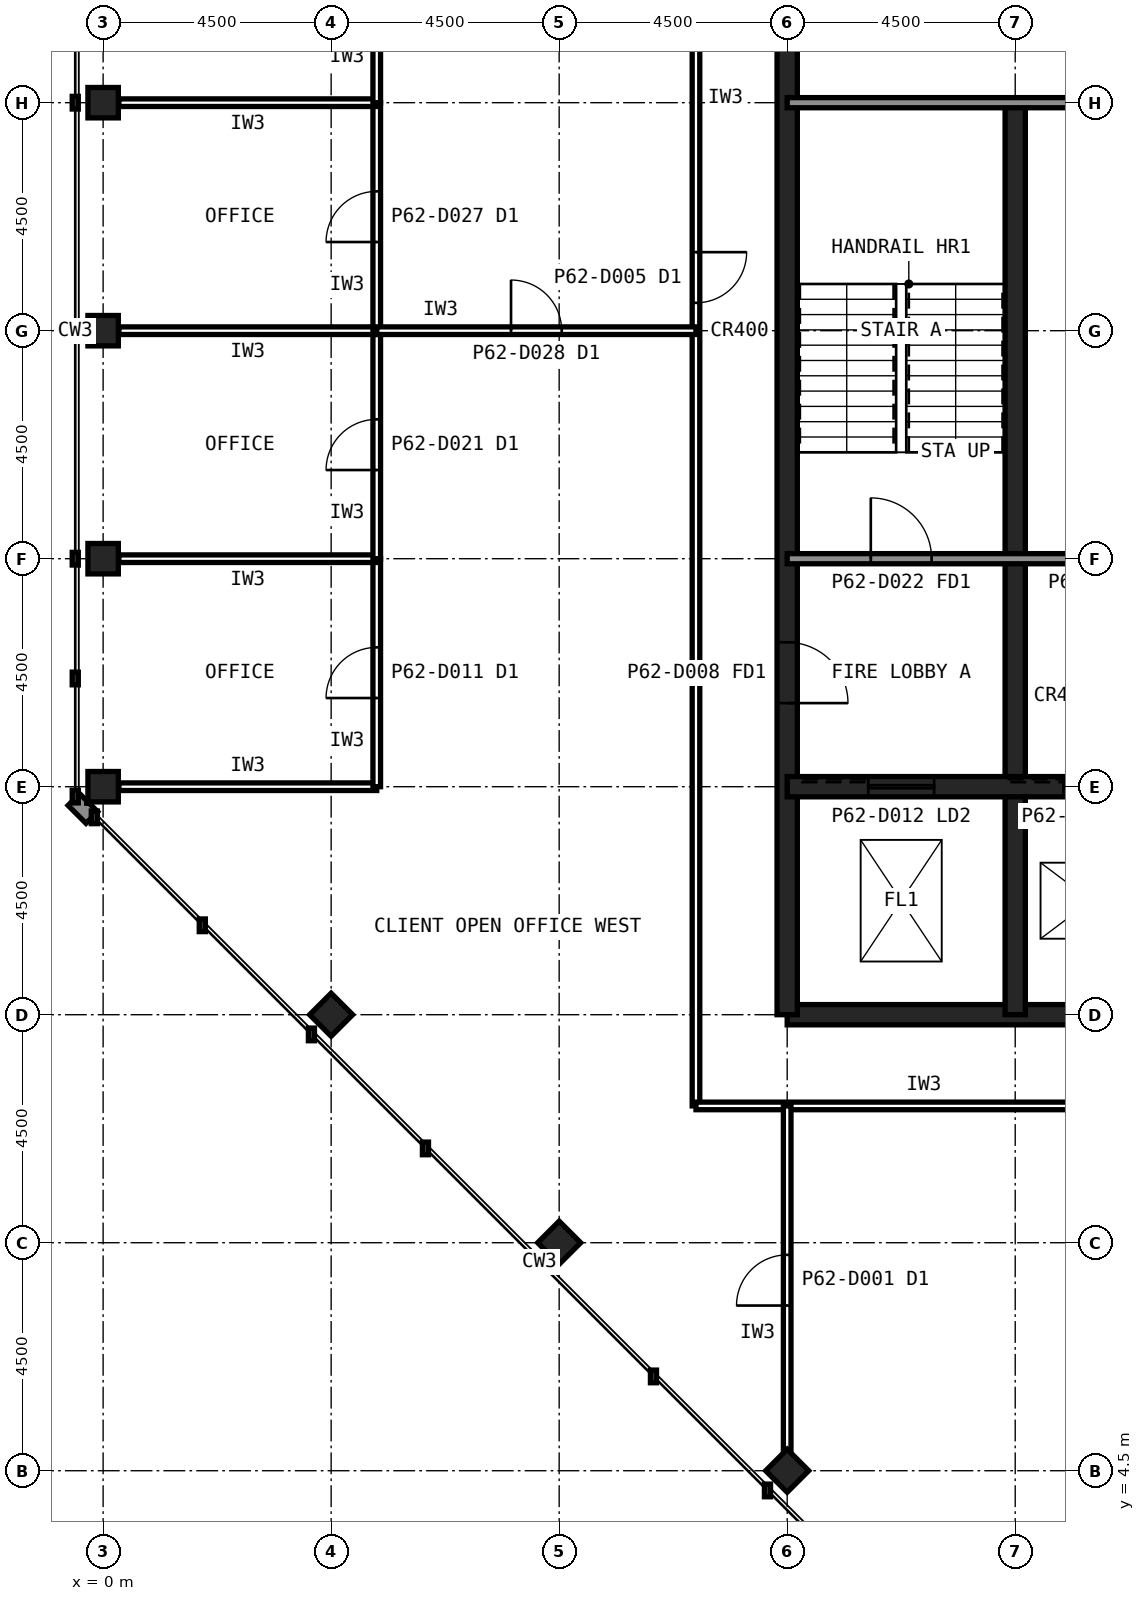
"""IFC4 building model, lengths in metres.
Left out: names, types, materials, properties, quantities, classifications, styles, units other than length and angle.
Written with IfcOpenShell. Run it as: python <this file> out.ifc"""

import sys

from ifc_helpers import new_model, si_unit, direction, frame, frame_2d, origin, origin_2d, place, context, subcontext, project, spatial, rectangle, hollow_rectangle, extrude, element, fill, save


model = new_model("IFC4")
c1 = context("Model", 3, precision=1e-05, world=origin(), true_north=direction((0.0, 1.0)))
c2 = subcontext(c1, "Body", "Model", "MODEL_VIEW")
j1 = project(units=[si_unit("LENGTHUNIT", "METRE"), si_unit("PLANEANGLEUNIT", "RADIAN")], contexts=[c1])
p1 = place(None, origin())
s1 = spatial("IfcSite", under=j1, at=p1, CompositionType="ELEMENT")
p2 = place(p1, origin())
s2 = spatial("IfcBuilding", under=s1, at=p2, CompositionType="ELEMENT")
p3 = place(p2, frame((0.0, 0.0, 262.6)))
s3 = spatial("IfcBuildingStorey", under=s2, at=p3, CompositionType="ELEMENT", Elevation=262.6)
for number, where, z_axis, x_axis in (
    (1, (0.0, 31.5, 0.0), (0.0, 0.0, 1.0), (1.0, 0.0, 0.0)),
    (2, (0.0, 27.0, 0.0), (0.0, 0.0, 1.0), (1.0, 0.0, 0.0)),
    (3, (0.0, 22.5, 0.0), (0.0, 0.0, 1.0), (1.0, 0.0, 0.0)),
    (4, (0.0, 18.0, 0.0), (0.0, 0.0, 1.0), (1.0, 0.0, 0.0)),
    (5, (13.5, 4.5, 0.0), (0.0, 0.0, 1.0), (0.707, 0.707, 0.0)),
    (6, (9.0, 9.0, 0.0), (0.0, 0.0, 1.0), (0.707, 0.707, 0.0)),
    (7, (4.5, 13.5, 0.0), (0.0, 0.0, 1.0), (0.707, 0.707, 0.0)),
):
    element("IfcColumn", number, at=place(p3, frame(where, z_axis=z_axis, x_axis=x_axis)), inside=s3, PredefinedType="COLUMN", context=c2, shape_type="SweptSolid", body=[
        extrude(hollow_rectangle(XDim=0.6, YDim=0.6, WallThickness=0.028, at=origin_2d()), origin(), (0.0, 0.0, 1.0), 4.0),
    ])
p4 = place(p3, frame((13.5, 13.5, 0.0), z_axis=(0.0, 0.0, 1.0), x_axis=(1.0, 0.0, 0.0)))
e8 = element("IfcWall", 8, at=p4, inside=s3, PredefinedType="SHEAR", context=c2, shape_type="SweptSolid", body=[
    extrude(rectangle(XDim=27.0, YDim=0.4, at=frame_2d((13.5, 0.0))), origin(), (0.0, 0.0, 1.0), 4.0),
])
p5 = place(p3, frame((13.5, 40.5, 0.0), z_axis=(0.0, 0.0, 1.0), x_axis=(0.0, -1.0, 0.0)))
e9 = element("IfcWall", 9, at=p5, inside=s3, PredefinedType="SHEAR", context=c2, shape_type="SweptSolid", body=[
    extrude(rectangle(XDim=27.0, YDim=0.4, at=frame_2d((13.5, 0.0))), origin(), (0.0, 0.0, 1.0), 4.0),
])
p6 = place(p5, frame((19.65, 0.0, 0.0)))
e10 = element("IfcOpeningElement", 10, at=p6, cuts=e9, PredefinedType="OPENING", context=c2, shape_type="SweptSolid", body=[
    extrude(rectangle(XDim=1.2, YDim=2.1, at=frame_2d((0.6, 1.05))), frame((0.0, 0.21, 0.0), z_axis=(0.0, -1.0, 0.0), x_axis=(1.0, 0.0, 0.0)), (0.0, 0.0, 1.0), 0.42),
])
p7 = place(p5, frame((5.85, 0.0, 0.0)))
e11 = element("IfcOpeningElement", 11, at=p7, cuts=e9, PredefinedType="OPENING", context=c2, shape_type="SweptSolid", body=[
    extrude(rectangle(XDim=1.8, YDim=2.1, at=frame_2d((0.9, 1.05))), frame((0.0, 0.21, 0.0), z_axis=(0.0, -1.0, 0.0), x_axis=(1.0, 0.0, 0.0)), (0.0, 0.0, 1.0), 0.42),
])
p8 = place(p3, frame((18.0, 13.5, 0.0), z_axis=(0.0, 0.0, 1.0), x_axis=(0.0, 1.0, 0.0)))
e12 = element("IfcWall", 12, at=p8, inside=s3, PredefinedType="SHEAR", context=c2, shape_type="SweptSolid", body=[
    extrude(rectangle(XDim=18.0, YDim=0.4, at=frame_2d((9.0, 0.0))), origin(), (0.0, 0.0, 1.0), 4.0),
])
p9 = place(p3, frame((13.5, 18.0, 0.0), z_axis=(0.0, 0.0, 1.0), x_axis=(1.0, 0.0, 0.0)))
e13 = element("IfcWall", 13, at=p9, inside=s3, PredefinedType="SHEAR", context=c2, shape_type="SweptSolid", body=[
    extrude(rectangle(XDim=27.0, YDim=0.4, at=frame_2d((13.5, 0.0))), origin(), (0.0, 0.0, 1.0), 4.0),
])
p10 = place(p9, frame((24.3, 0.0, 0.0)))
e14 = element("IfcOpeningElement", 14, at=p10, cuts=e13, PredefinedType="OPENING", context=c2, shape_type="SweptSolid", body=[
    extrude(rectangle(XDim=0.9, YDim=2.1, at=frame_2d((0.45, 1.05))), frame((0.0, 0.21, 0.0), z_axis=(0.0, -1.0, 0.0), x_axis=(1.0, 0.0, 0.0)), (0.0, 0.0, 1.0), 0.42),
])
p11 = place(p9, frame((5.45, 0.0, 0.0)))
e15 = element("IfcOpeningElement", 15, at=p11, cuts=e13, PredefinedType="OPENING", context=c2, shape_type="SweptSolid", body=[
    extrude(rectangle(XDim=1.1, YDim=2.1, at=frame_2d((0.55, 1.05))), frame((0.0, 0.21, 0.0), z_axis=(0.0, -1.0, 0.0), x_axis=(1.0, 0.0, 0.0)), (0.0, 0.0, 1.0), 0.42),
])
p12 = place(p9, frame((8.45, 0.0, 0.0)))
e16 = element("IfcOpeningElement", 16, at=p12, cuts=e13, PredefinedType="OPENING", context=c2, shape_type="SweptSolid", body=[
    extrude(rectangle(XDim=1.1, YDim=2.1, at=frame_2d((0.55, 1.05))), frame((0.0, 0.21, 0.0), z_axis=(0.0, -1.0, 0.0), x_axis=(1.0, 0.0, 0.0)), (0.0, 0.0, 1.0), 0.42),
])
p13 = place(p9, frame((11.45, 0.0, 0.0)))
e17 = element("IfcOpeningElement", 17, at=p13, cuts=e13, PredefinedType="OPENING", context=c2, shape_type="SweptSolid", body=[
    extrude(rectangle(XDim=1.1, YDim=2.1, at=frame_2d((0.55, 1.05))), frame((0.0, 0.21, 0.0), z_axis=(0.0, -1.0, 0.0), x_axis=(1.0, 0.0, 0.0)), (0.0, 0.0, 1.0), 0.42),
])
p14 = place(p9, frame((14.45, 0.0, 0.0)))
e18 = element("IfcOpeningElement", 18, at=p14, cuts=e13, PredefinedType="OPENING", context=c2, shape_type="SweptSolid", body=[
    extrude(rectangle(XDim=1.1, YDim=2.1, at=frame_2d((0.55, 1.05))), frame((0.0, 0.21, 0.0), z_axis=(0.0, -1.0, 0.0), x_axis=(1.0, 0.0, 0.0)), (0.0, 0.0, 1.0), 0.42),
])
p15 = place(p9, frame((17.45, 0.0, 0.0)))
e19 = element("IfcOpeningElement", 19, at=p15, cuts=e13, PredefinedType="OPENING", context=c2, shape_type="SweptSolid", body=[
    extrude(rectangle(XDim=1.1, YDim=2.1, at=frame_2d((0.55, 1.05))), frame((0.0, 0.21, 0.0), z_axis=(0.0, -1.0, 0.0), x_axis=(1.0, 0.0, 0.0)), (0.0, 0.0, 1.0), 0.42),
])
p16 = place(p9, frame((20.45, 0.0, 0.0)))
e20 = element("IfcOpeningElement", 20, at=p16, cuts=e13, PredefinedType="OPENING", context=c2, shape_type="SweptSolid", body=[
    extrude(rectangle(XDim=1.1, YDim=2.1, at=frame_2d((0.55, 1.05))), frame((0.0, 0.21, 0.0), z_axis=(0.0, -1.0, 0.0), x_axis=(1.0, 0.0, 0.0)), (0.0, 0.0, 1.0), 0.42),
])
p17 = place(p9, frame((1.6, 0.0, 0.0)))
e21 = element("IfcOpeningElement", 21, at=p17, cuts=e13, PredefinedType="OPENING", context=c2, shape_type="SweptSolid", body=[
    extrude(rectangle(XDim=1.3, YDim=2.2, at=frame_2d((0.65, 1.1))), frame((0.0, 0.21, 0.0), z_axis=(0.0, -1.0, 0.0), x_axis=(1.0, 0.0, 0.0)), (0.0, 0.0, 1.0), 0.42),
])
p18 = place(p3, frame((13.5, 22.5, 0.0), z_axis=(0.0, 0.0, 1.0), x_axis=(1.0, 0.0, 0.0)))
e22 = element("IfcWall", 22, at=p18, inside=s3, PredefinedType="SOLIDWALL", context=c2, shape_type="SweptSolid", body=[
    extrude(rectangle(XDim=27.0, YDim=0.2, at=frame_2d((13.5, 0.0))), origin(), (0.0, 0.0, 1.0), 3.84),
])
p19 = place(p18, frame((1.65, 0.0, 0.0)))
e23 = element("IfcOpeningElement", 23, at=p19, cuts=e22, PredefinedType="OPENING", context=c2, shape_type="SweptSolid", body=[
    extrude(rectangle(XDim=1.2, YDim=2.1, at=frame_2d((0.6, 1.05))), frame((0.0, 0.11, 0.0), z_axis=(0.0, -1.0, 0.0), x_axis=(1.0, 0.0, 0.0)), (0.0, 0.0, 1.0), 0.22),
])
p20 = place(p18, frame((6.025, 0.0, 0.0)))
e24 = element("IfcOpeningElement", 24, at=p20, cuts=e22, PredefinedType="OPENING", context=c2, shape_type="SweptSolid", body=[
    extrude(rectangle(XDim=1.0, YDim=2.1, at=frame_2d((0.5, 1.05))), frame((0.0, 0.11, 0.0), z_axis=(0.0, -1.0, 0.0), x_axis=(1.0, 0.0, 0.0)), (0.0, 0.0, 1.0), 0.22),
])
p21 = place(p18, frame((10.525, 0.0, 0.0)))
e25 = element("IfcOpeningElement", 25, at=p21, cuts=e22, PredefinedType="OPENING", context=c2, shape_type="SweptSolid", body=[
    extrude(rectangle(XDim=1.0, YDim=2.1, at=frame_2d((0.5, 1.05))), frame((0.0, 0.11, 0.0), z_axis=(0.0, -1.0, 0.0), x_axis=(1.0, 0.0, 0.0)), (0.0, 0.0, 1.0), 0.22),
])
p22 = place(p18, frame((19.75, 0.0, 0.0)))
e26 = element("IfcOpeningElement", 26, at=p22, cuts=e22, PredefinedType="OPENING", context=c2, shape_type="SweptSolid", body=[
    extrude(rectangle(XDim=1.0, YDim=2.1, at=frame_2d((0.5, 1.05))), frame((0.0, 0.11, 0.0), z_axis=(0.0, -1.0, 0.0), x_axis=(1.0, 0.0, 0.0)), (0.0, 0.0, 1.0), 0.22),
])
p23 = place(p18, frame((15.05, 0.0, 0.0)))
e27 = element("IfcOpeningElement", 27, at=p23, cuts=e22, PredefinedType="OPENING", context=c2, shape_type="SweptSolid", body=[
    extrude(rectangle(XDim=1.4, YDim=2.4, at=frame_2d((0.7, 1.2))), frame((0.0, 0.11, 0.0), z_axis=(0.0, -1.0, 0.0), x_axis=(1.0, 0.0, 0.0)), (0.0, 0.0, 1.0), 0.22),
])
p24 = place(p3, frame((13.5, 31.5, 0.0), z_axis=(0.0, 0.0, 1.0), x_axis=(1.0, 0.0, 0.0)))
e28 = element("IfcWall", 28, at=p24, inside=s3, PredefinedType="SOLIDWALL", context=c2, shape_type="SweptSolid", body=[
    extrude(rectangle(XDim=27.0, YDim=0.2, at=frame_2d((13.5, 0.0))), origin(), (0.0, 0.0, 1.0), 3.84),
])
p25 = place(p24, frame((24.15, 0.0, 0.0)))
e29 = element("IfcOpeningElement", 29, at=p25, cuts=e28, PredefinedType="OPENING", context=c2, shape_type="SweptSolid", body=[
    extrude(rectangle(XDim=1.2, YDim=2.1, at=frame_2d((0.6, 1.05))), frame((0.0, 0.11, 0.0), z_axis=(0.0, -1.0, 0.0), x_axis=(1.0, 0.0, 0.0)), (0.0, 0.0, 1.0), 0.22),
])
p26 = place(p24, frame((15.3, 0.0, 0.0)))
e30 = element("IfcOpeningElement", 30, at=p26, cuts=e28, PredefinedType="OPENING", context=c2, shape_type="SweptSolid", body=[
    extrude(rectangle(XDim=0.9, YDim=2.1, at=frame_2d((0.45, 1.05))), frame((0.0, 0.11, 0.0), z_axis=(0.0, -1.0, 0.0), x_axis=(1.0, 0.0, 0.0)), (0.0, 0.0, 1.0), 0.22),
])
p27 = place(p24, frame((19.8, 0.0, 0.0)))
e31 = element("IfcOpeningElement", 31, at=p27, cuts=e28, PredefinedType="OPENING", context=c2, shape_type="SweptSolid", body=[
    extrude(rectangle(XDim=0.9, YDim=2.1, at=frame_2d((0.45, 1.05))), frame((0.0, 0.11, 0.0), z_axis=(0.0, -1.0, 0.0), x_axis=(1.0, 0.0, 0.0)), (0.0, 0.0, 1.0), 0.22),
])
p28 = place(p3, frame((11.7, 42.3, 0.0), z_axis=(0.0, 0.0, 1.0), x_axis=(0.0, -1.0, 0.0)))
e32 = element("IfcWall", 32, at=p28, inside=s3, PredefinedType="PARTITIONING", context=c2, shape_type="SweptSolid", body=[
    extrude(rectangle(XDim=30.6, YDim=0.15, at=frame_2d((15.3, 0.0))), origin(), (0.0, 0.0, 1.0), 3.84),
])
p29 = place(p28, frame((13.75, 0.0, 0.0)))
e33 = element("IfcOpeningElement", 33, at=p29, cuts=e32, PredefinedType="OPENING", context=c2, shape_type="SweptSolid", body=[
    extrude(rectangle(XDim=1.0, YDim=2.1, at=frame_2d((0.5, 1.05))), frame((0.0, 0.085, 0.0), z_axis=(0.0, -1.0, 0.0), x_axis=(1.0, 0.0, 0.0)), (0.0, 0.0, 1.0), 0.17),
])
p30 = place(p3, frame((11.7, 11.7, 0.0), z_axis=(0.0, 0.0, 1.0), x_axis=(1.0, 0.0, 0.0)))
e34 = element("IfcWall", 34, at=p30, inside=s3, PredefinedType="PARTITIONING", context=c2, shape_type="SweptSolid", body=[
    extrude(rectangle(XDim=9.0, YDim=0.15, at=frame_2d((4.5, 0.0))), origin(), (0.0, 0.0, 1.0), 3.84),
])
p31 = place(p3, frame((0.31, 18.0, 0.0), z_axis=(0.0, 0.0, 1.0), x_axis=(1.0, 0.0, 0.0)))
e35 = element("IfcWall", 35, at=p31, inside=s3, PredefinedType="PARTITIONING", context=c2, shape_type="SweptSolid", body=[
    extrude(rectangle(XDim=5.09, YDim=0.15, at=frame_2d((2.545, 0.0))), origin(), (0.0, 0.0, 1.0), 2.989),
])
p32 = place(p3, frame((5.4, 18.0, 0.0), z_axis=(0.0, 0.0, 1.0), x_axis=(0.0, 1.0, 0.0)))
e36 = element("IfcWall", 36, at=p32, inside=s3, PredefinedType="PARTITIONING", context=c2, shape_type="SweptSolid", body=[
    extrude(rectangle(XDim=4.5, YDim=0.15, at=frame_2d((2.25, 0.0))), origin(), (0.0, 0.0, 1.0), 3.84),
])
p33 = place(p32, frame((1.75, 0.0, 0.0)))
e37 = element("IfcOpeningElement", 37, at=p33, cuts=e36, PredefinedType="OPENING", context=c2, shape_type="SweptSolid", body=[
    extrude(rectangle(XDim=1.0, YDim=2.1, at=frame_2d((0.5, 1.05))), frame((0.0, 0.085, 0.0), z_axis=(0.0, -1.0, 0.0), x_axis=(1.0, 0.0, 0.0)), (0.0, 0.0, 1.0), 0.17),
])
p34 = place(p3, frame((5.4, 22.5, 0.0), z_axis=(0.0, 0.0, 1.0), x_axis=(-1.0, 0.0, 0.0)))
e38 = element("IfcWall", 38, at=p34, inside=s3, PredefinedType="PARTITIONING", context=c2, shape_type="SweptSolid", body=[
    extrude(rectangle(XDim=5.09, YDim=0.15, at=frame_2d((2.545, 0.0))), origin(), (0.0, 0.0, 1.0), 2.989),
])
p35 = place(p3, frame((5.4, 22.5, 0.0), z_axis=(0.0, 0.0, 1.0), x_axis=(0.0, 1.0, 0.0)))
e39 = element("IfcWall", 39, at=p35, inside=s3, PredefinedType="PARTITIONING", context=c2, shape_type="SweptSolid", body=[
    extrude(rectangle(XDim=4.5, YDim=0.15, at=frame_2d((2.25, 0.0))), origin(), (0.0, 0.0, 1.0), 3.84),
])
p36 = place(p35, frame((1.75, 0.0, 0.0)))
e40 = element("IfcOpeningElement", 40, at=p36, cuts=e39, PredefinedType="OPENING", context=c2, shape_type="SweptSolid", body=[
    extrude(rectangle(XDim=1.0, YDim=2.1, at=frame_2d((0.5, 1.05))), frame((0.0, 0.085, 0.0), z_axis=(0.0, -1.0, 0.0), x_axis=(1.0, 0.0, 0.0)), (0.0, 0.0, 1.0), 0.17),
])
p37 = place(p3, frame((5.4, 27.0, 0.0), z_axis=(0.0, 0.0, 1.0), x_axis=(-1.0, 0.0, 0.0)))
e41 = element("IfcWall", 41, at=p37, inside=s3, PredefinedType="PARTITIONING", context=c2, shape_type="SweptSolid", body=[
    extrude(rectangle(XDim=5.09, YDim=0.15, at=frame_2d((2.545, 0.0))), origin(), (0.0, 0.0, 1.0), 2.989),
])
p38 = place(p3, frame((5.4, 27.0, 0.0), z_axis=(0.0, 0.0, 1.0), x_axis=(0.0, 1.0, 0.0)))
e42 = element("IfcWall", 42, at=p38, inside=s3, PredefinedType="PARTITIONING", context=c2, shape_type="SweptSolid", body=[
    extrude(rectangle(XDim=4.5, YDim=0.15, at=frame_2d((2.25, 0.0))), origin(), (0.0, 0.0, 1.0), 3.84),
])
p39 = place(p38, frame((1.75, 0.0, 0.0)))
e43 = element("IfcOpeningElement", 43, at=p39, cuts=e42, PredefinedType="OPENING", context=c2, shape_type="SweptSolid", body=[
    extrude(rectangle(XDim=1.0, YDim=2.1, at=frame_2d((0.5, 1.05))), frame((0.0, 0.085, 0.0), z_axis=(0.0, -1.0, 0.0), x_axis=(1.0, 0.0, 0.0)), (0.0, 0.0, 1.0), 0.17),
])
p40 = place(p3, frame((5.4, 31.5, 0.0), z_axis=(0.0, 0.0, 1.0), x_axis=(-1.0, 0.0, 0.0)))
e44 = element("IfcWall", 44, at=p40, inside=s3, PredefinedType="PARTITIONING", context=c2, shape_type="SweptSolid", body=[
    extrude(rectangle(XDim=5.09, YDim=0.15, at=frame_2d((2.545, 0.0))), origin(), (0.0, 0.0, 1.0), 2.989),
])
p41 = place(p3, frame((5.4, 31.5, 0.0), z_axis=(0.0, 0.0, 1.0), x_axis=(0.0, 1.0, 0.0)))
e45 = element("IfcWall", 45, at=p41, inside=s3, PredefinedType="PARTITIONING", context=c2, shape_type="SweptSolid", body=[
    extrude(rectangle(XDim=4.5, YDim=0.15, at=frame_2d((2.25, 0.0))), origin(), (0.0, 0.0, 1.0), 3.84),
])
p42 = place(p41, frame((1.75, 0.0, 0.0)))
e46 = element("IfcOpeningElement", 46, at=p42, cuts=e45, PredefinedType="OPENING", context=c2, shape_type="SweptSolid", body=[
    extrude(rectangle(XDim=1.0, YDim=2.1, at=frame_2d((0.5, 1.05))), frame((0.0, 0.085, 0.0), z_axis=(0.0, -1.0, 0.0), x_axis=(1.0, 0.0, 0.0)), (0.0, 0.0, 1.0), 0.17),
])
p43 = place(p3, frame((13.5, 4.82, 0.0), z_axis=(0.0, 0.0, 1.0), x_axis=(0.0, 1.0, 0.0)))
e47 = element("IfcWall", 47, at=p43, inside=s3, PredefinedType="PARTITIONING", context=c2, shape_type="SweptSolid", body=[
    extrude(rectangle(XDim=6.88, YDim=0.15, at=frame_2d((3.44, 0.0))), origin(), (0.0, 0.0, 1.0), 2.989),
])
p44 = place(p43, frame((2.94, 0.0, 0.0)))
e48 = element("IfcOpeningElement", 48, at=p44, cuts=e47, PredefinedType="OPENING", context=c2, shape_type="SweptSolid", body=[
    extrude(rectangle(XDim=1.0, YDim=2.1, at=frame_2d((0.5, 1.05))), frame((0.0, 0.085, 0.0), z_axis=(0.0, -1.0, 0.0), x_axis=(1.0, 0.0, 0.0)), (0.0, 0.0, 1.0), 0.17),
])
p45 = place(p3, frame((5.4, 27.0, 0.0), z_axis=(0.0, 0.0, 1.0), x_axis=(1.0, 0.0, 0.0)))
e49 = element("IfcWall", 49, at=p45, inside=s3, PredefinedType="PARTITIONING", context=c2, shape_type="SweptSolid", body=[
    extrude(rectangle(XDim=6.3, YDim=0.15, at=frame_2d((3.15, 0.0))), origin(), (0.0, 0.0, 1.0), 2.989),
])
p46 = place(p45, frame((2.65, 0.0, 0.0)))
e50 = element("IfcOpeningElement", 50, at=p46, cuts=e49, PredefinedType="OPENING", context=c2, shape_type="SweptSolid", body=[
    extrude(rectangle(XDim=1.0, YDim=2.1, at=frame_2d((0.5, 1.05))), frame((0.0, 0.085, 0.0), z_axis=(0.0, -1.0, 0.0), x_axis=(1.0, 0.0, 0.0)), (0.0, 0.0, 1.0), 0.17),
])
p47 = place(p6, origin())
e51 = element("IfcDoor", 51, at=p47, inside=s3, OperationType="SINGLE_SWING_RIGHT", PredefinedType="DOOR", context=c2, shape_type="SweptSolid", body=[
    extrude(rectangle(XDim=1.2, YDim=2.1, at=frame_2d((0.6, 1.05))), frame((0.0, 0.025, 0.0), z_axis=(0.0, -1.0, 0.0), x_axis=(1.0, 0.0, 0.0)), (0.0, 0.0, 1.0), 0.05),
])
fill(e10, e51)
p48 = place(p19, origin())
e52 = element("IfcDoor", 52, at=p48, inside=s3, OperationType="SINGLE_SWING_LEFT", PredefinedType="DOOR", context=c2, shape_type="SweptSolid", body=[
    extrude(rectangle(XDim=1.2, YDim=2.1, at=frame_2d((0.6, 1.05))), frame((0.0, 0.025, 0.0), z_axis=(0.0, -1.0, 0.0), x_axis=(1.0, 0.0, 0.0)), (0.0, 0.0, 1.0), 0.05),
])
fill(e23, e52)
p49 = place(p11, origin())
e53 = element("IfcDoor", 53, at=p49, inside=s3, OperationType="SLIDING_TO_LEFT", PredefinedType="DOOR", context=c2, shape_type="SweptSolid", body=[
    extrude(rectangle(XDim=1.1, YDim=2.1, at=frame_2d((0.55, 1.05))), frame((0.0, 0.025, 0.0), z_axis=(0.0, -1.0, 0.0), x_axis=(1.0, 0.0, 0.0)), (0.0, 0.0, 1.0), 0.05),
])
fill(e15, e53)
p50 = place(p17, origin())
e54 = element("IfcDoor", 54, at=p50, inside=s3, OperationType="SLIDING_TO_LEFT", PredefinedType="DOOR", context=c2, shape_type="SweptSolid", body=[
    extrude(rectangle(XDim=1.3, YDim=2.2, at=frame_2d((0.65, 1.1))), frame((0.0, 0.025, 0.0), z_axis=(0.0, -1.0, 0.0), x_axis=(1.0, 0.0, 0.0)), (0.0, 0.0, 1.0), 0.05),
])
fill(e21, e54)
p51 = place(p29, origin())
e55 = element("IfcDoor", 55, at=p51, inside=s3, OperationType="SINGLE_SWING_LEFT", PredefinedType="DOOR", context=c2, shape_type="SweptSolid", body=[
    extrude(rectangle(XDim=1.0, YDim=2.1, at=frame_2d((0.5, 1.05))), frame((0.0, 0.025, 0.0), z_axis=(0.0, -1.0, 0.0), x_axis=(1.0, 0.0, 0.0)), (0.0, 0.0, 1.0), 0.05),
])
fill(e33, e55)
p52 = place(p33, origin())
e56 = element("IfcDoor", 56, at=p52, inside=s3, OperationType="SINGLE_SWING_LEFT", PredefinedType="DOOR", context=c2, shape_type="SweptSolid", body=[
    extrude(rectangle(XDim=1.0, YDim=2.1, at=frame_2d((0.5, 1.05))), frame((0.0, 0.025, 0.0), z_axis=(0.0, -1.0, 0.0), x_axis=(1.0, 0.0, 0.0)), (0.0, 0.0, 1.0), 0.05),
])
fill(e37, e56)
p53 = place(p36, origin())
e57 = element("IfcDoor", 57, at=p53, inside=s3, OperationType="SINGLE_SWING_LEFT", PredefinedType="DOOR", context=c2, shape_type="SweptSolid", body=[
    extrude(rectangle(XDim=1.0, YDim=2.1, at=frame_2d((0.5, 1.05))), frame((0.0, 0.025, 0.0), z_axis=(0.0, -1.0, 0.0), x_axis=(1.0, 0.0, 0.0)), (0.0, 0.0, 1.0), 0.05),
])
fill(e40, e57)
p54 = place(p39, origin())
e58 = element("IfcDoor", 58, at=p54, inside=s3, OperationType="SINGLE_SWING_LEFT", PredefinedType="DOOR", context=c2, shape_type="SweptSolid", body=[
    extrude(rectangle(XDim=1.0, YDim=2.1, at=frame_2d((0.5, 1.05))), frame((0.0, 0.025, 0.0), z_axis=(0.0, -1.0, 0.0), x_axis=(1.0, 0.0, 0.0)), (0.0, 0.0, 1.0), 0.05),
])
fill(e43, e58)
p55 = place(p44, origin())
e59 = element("IfcDoor", 59, at=p55, inside=s3, OperationType="SINGLE_SWING_LEFT", PredefinedType="DOOR", context=c2, shape_type="SweptSolid", body=[
    extrude(rectangle(XDim=1.0, YDim=2.1, at=frame_2d((0.5, 1.05))), frame((0.0, 0.025, 0.0), z_axis=(0.0, -1.0, 0.0), x_axis=(1.0, 0.0, 0.0)), (0.0, 0.0, 1.0), 0.05),
])
fill(e48, e59)
p56 = place(p46, origin())
e60 = element("IfcDoor", 60, at=p56, inside=s3, OperationType="SINGLE_SWING_LEFT", PredefinedType="DOOR", context=c2, shape_type="SweptSolid", body=[
    extrude(rectangle(XDim=1.0, YDim=2.1, at=frame_2d((0.5, 1.05))), frame((0.0, 0.025, 0.0), z_axis=(0.0, -1.0, 0.0), x_axis=(1.0, 0.0, 0.0)), (0.0, 0.0, 1.0), 0.05),
])
fill(e50, e60)
save(model, sys.argv[1])
